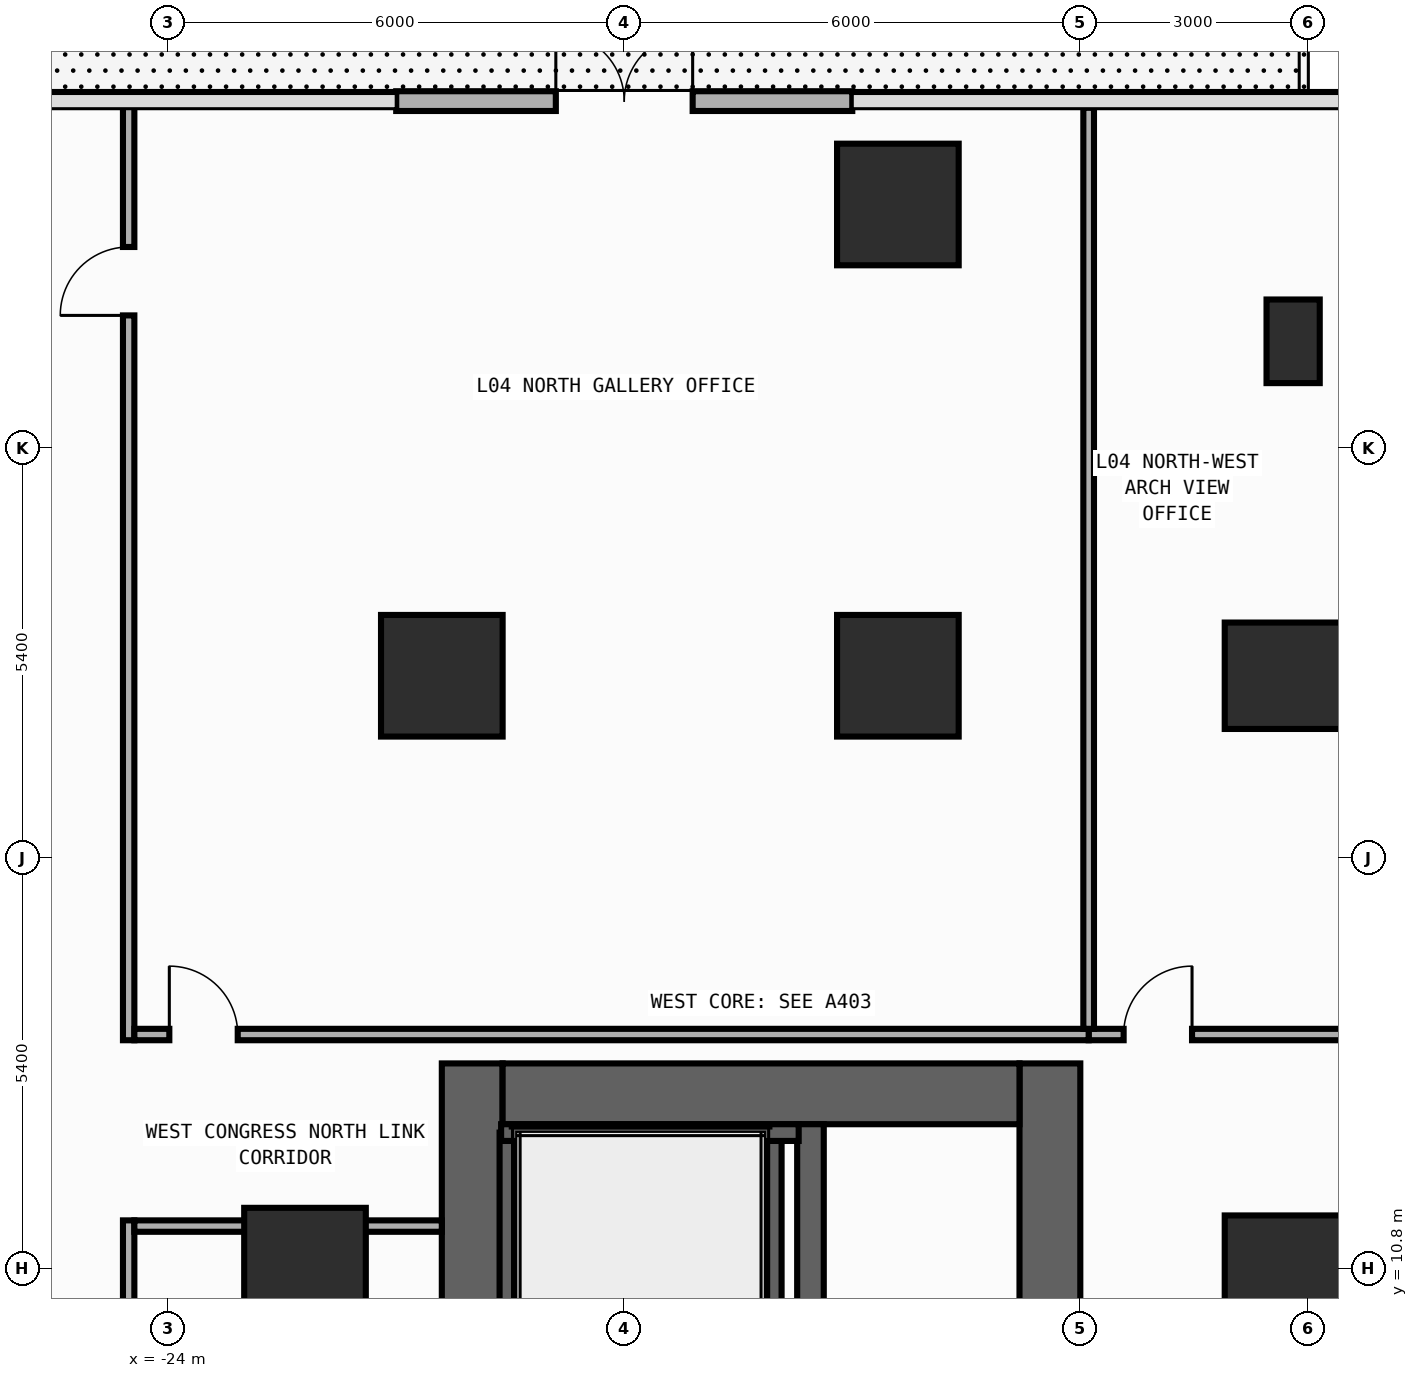
"""IFC4 building model, lengths in metres.
Left out: names, types, materials, properties, quantities, classifications, styles, units other than length and angle.
Written with IfcOpenShell. Run it as: python <this file> out.ifc"""

import sys

from ifc_helpers import new_model, si_unit, direction, frame, frame_2d, origin, origin_2d, place, context, subcontext, project, spatial, rectangle, extrude, element, fill, save


model = new_model("IFC4")
c1 = context("Model", 3, precision=1e-05, world=origin(), true_north=direction((0.0, 1.0)))
c2 = subcontext(c1, "Body", "Model", "MODEL_VIEW")
j1 = project(units=[si_unit("LENGTHUNIT", "METRE"), si_unit("PLANEANGLEUNIT", "RADIAN")], contexts=[c1])
p1 = place(None, origin())
s1 = spatial("IfcSite", under=j1, at=p1, CompositionType="ELEMENT")
p2 = place(p1, origin())
s2 = spatial("IfcBuilding", under=s1, at=p2, CompositionType="ELEMENT")
p3 = place(p2, frame((0.0, 0.0, 16.0)))
s3 = spatial("IfcBuildingStorey", under=s2, at=p3, CompositionType="ELEMENT", Elevation=16.0)
p4 = place(p3, frame((-20.0, -13.5, 0.0), z_axis=(0.0, 0.0, 1.0), x_axis=(0.0, 1.0, 0.0)))
e1 = element("IfcWall", 1, at=p4, inside=s3, PredefinedType="SHEAR", context=c2, shape_type="SweptSolid", body=[
    extrude(rectangle(XDim=27.0, YDim=0.8, at=frame_2d((13.5, 0.0))), origin(), (0.0, 0.0, 1.0), 4.55),
])
p5 = place(p3, frame((-12.4, -13.5, 0.0), z_axis=(0.0, 0.0, 1.0), x_axis=(0.0, 1.0, 0.0)))
e2 = element("IfcWall", 2, at=p5, inside=s3, PredefinedType="SHEAR", context=c2, shape_type="SweptSolid", body=[
    extrude(rectangle(XDim=27.0, YDim=0.8, at=frame_2d((13.5, 0.0))), origin(), (0.0, 0.0, 1.0), 4.55),
])
p6 = place(p5, frame((21.55, 0.0, 0.0)))
e3 = element("IfcOpeningElement", 3, at=p6, cuts=e2, PredefinedType="OPENING", context=c2, shape_type="SweptSolid", body=[
    extrude(rectangle(XDim=1.1, YDim=2.2, at=frame_2d((0.55, 1.1))), frame((0.0, 0.41, 0.0), z_axis=(0.0, -1.0, 0.0), x_axis=(1.0, 0.0, 0.0)), (0.0, 0.0, 1.0), 0.82),
])
p7 = place(p5, frame((18.35, 0.0, 0.0)))
e4 = element("IfcOpeningElement", 4, at=p7, cuts=e2, PredefinedType="OPENING", context=c2, shape_type="SweptSolid", body=[
    extrude(rectangle(XDim=1.1, YDim=2.2, at=frame_2d((0.55, 1.1))), frame((0.0, 0.41, 0.0), z_axis=(0.0, -1.0, 0.0), x_axis=(1.0, 0.0, 0.0)), (0.0, 0.0, 1.0), 0.82),
])
p8 = place(p5, frame((15.15, 0.0, 0.0)))
e5 = element("IfcOpeningElement", 5, at=p8, cuts=e2, PredefinedType="OPENING", context=c2, shape_type="SweptSolid", body=[
    extrude(rectangle(XDim=1.1, YDim=2.2, at=frame_2d((0.55, 1.1))), frame((0.0, 0.41, 0.0), z_axis=(0.0, -1.0, 0.0), x_axis=(1.0, 0.0, 0.0)), (0.0, 0.0, 1.0), 0.82),
])
p9 = place(p5, frame((10.35, 0.0, 0.0)))
e6 = element("IfcOpeningElement", 6, at=p9, cuts=e2, PredefinedType="OPENING", context=c2, shape_type="SweptSolid", body=[
    extrude(rectangle(XDim=1.1, YDim=2.2, at=frame_2d((0.55, 1.1))), frame((0.0, 0.41, 0.0), z_axis=(0.0, -1.0, 0.0), x_axis=(1.0, 0.0, 0.0)), (0.0, 0.0, 1.0), 0.82),
])
p10 = place(p5, frame((7.15, 0.0, 0.0)))
e7 = element("IfcOpeningElement", 7, at=p10, cuts=e2, PredefinedType="OPENING", context=c2, shape_type="SweptSolid", body=[
    extrude(rectangle(XDim=1.1, YDim=2.2, at=frame_2d((0.55, 1.1))), frame((0.0, 0.41, 0.0), z_axis=(0.0, -1.0, 0.0), x_axis=(1.0, 0.0, 0.0)), (0.0, 0.0, 1.0), 0.82),
])
p11 = place(p5, frame((3.95, 0.0, 0.0)))
e8 = element("IfcOpeningElement", 8, at=p11, cuts=e2, PredefinedType="OPENING", context=c2, shape_type="SweptSolid", body=[
    extrude(rectangle(XDim=1.1, YDim=2.2, at=frame_2d((0.55, 1.1))), frame((0.0, 0.41, 0.0), z_axis=(0.0, -1.0, 0.0), x_axis=(1.0, 0.0, 0.0)), (0.0, 0.0, 1.0), 0.82),
])
p12 = place(p5, frame((12.725, 0.0, 0.0)))
e9 = element("IfcOpeningElement", 9, at=p12, cuts=e2, PredefinedType="OPENING", context=c2, shape_type="SweptSolid", body=[
    extrude(rectangle(XDim=1.15, YDim=2.2, at=frame_2d((0.575, 1.1))), frame((0.0, 0.41, 0.0), z_axis=(0.0, -1.0, 0.0), x_axis=(1.0, 0.0, 0.0)), (0.0, 0.0, 1.0), 0.82),
])
p13 = place(p5, frame((1.625, 0.0, 0.0)))
e10 = element("IfcOpeningElement", 10, at=p13, cuts=e2, PredefinedType="OPENING", context=c2, shape_type="SweptSolid", body=[
    extrude(rectangle(XDim=0.85, YDim=2.1, at=frame_2d((0.425, 1.05))), frame((0.0, 0.41, 0.0), z_axis=(0.0, -1.0, 0.0), x_axis=(1.0, 0.0, 0.0)), (0.0, 0.0, 1.0), 0.82),
])
p14 = place(p3, frame((-19.6, 13.1, 0.0), z_axis=(0.0, 0.0, 1.0), x_axis=(1.0, 0.0, 0.0)))
e11 = element("IfcWall", 11, at=p14, inside=s3, PredefinedType="SHEAR", context=c2, shape_type="SweptSolid", body=[
    extrude(rectangle(XDim=6.8, YDim=0.8, at=frame_2d((3.4, 0.0))), origin(), (0.0, 0.0, 1.0), 4.55),
])
p15 = place(p3, frame((-15.55, -12.7, 0.0), z_axis=(0.0, 0.0, 1.0), x_axis=(0.0, 1.0, 0.0)))
e12 = element("IfcWall", 12, at=p15, inside=s3, PredefinedType="SHEAR", context=c2, shape_type="SweptSolid", body=[
    extrude(rectangle(XDim=25.4, YDim=0.35, at=frame_2d((12.7, 0.0))), origin(), (0.0, 0.0, 1.0), 4.55),
])
p16 = place(p15, frame((11.925, 0.0, 0.0)))
e13 = element("IfcOpeningElement", 13, at=p16, cuts=e12, PredefinedType="OPENING", context=c2, shape_type="SweptSolid", body=[
    extrude(rectangle(XDim=1.15, YDim=2.2, at=frame_2d((0.575, 1.1))), frame((0.0, 0.185, 0.0), z_axis=(0.0, -1.0, 0.0), x_axis=(1.0, 0.0, 0.0)), (0.0, 0.0, 1.0), 0.37),
])
p17 = place(p15, frame((0.825, 0.0, 0.0)))
e14 = element("IfcOpeningElement", 14, at=p17, cuts=e12, PredefinedType="OPENING", context=c2, shape_type="SweptSolid", body=[
    extrude(rectangle(XDim=0.85, YDim=2.1, at=frame_2d((0.425, 1.05))), frame((0.0, 0.185, 0.0), z_axis=(0.0, -1.0, 0.0), x_axis=(1.0, 0.0, 0.0)), (0.0, 0.0, 1.0), 0.37),
])
for number, where, z_axis, x_axis in (
    (15, (-16.04, 1.29, 0.0), (0.0, 0.0, 1.0), (0.0, 1.0, 0.0)),
    (16, (-19.53, 1.29, 0.0), (0.0, 0.0, 1.0), (0.0, 1.0, 0.0)),
):
    element("IfcWall", number, at=place(p3, frame(where, z_axis=z_axis, x_axis=x_axis)), inside=s3, PredefinedType="SHEAR", context=c2, shape_type="SweptSolid", body=[
        extrude(rectangle(XDim=11.3, YDim=0.22, at=frame_2d((5.65, 0.0))), origin(), (0.0, 0.0, 1.0), 4.55),
    ])
p18 = place(p3, frame((-19.62, 12.59, 0.0), z_axis=(0.0, 0.0, 1.0), x_axis=(1.0, 0.0, 0.0)))
e17 = element("IfcWall", 17, at=p18, inside=s3, PredefinedType="SHEAR", context=c2, shape_type="SweptSolid", body=[
    extrude(rectangle(XDim=3.915, YDim=0.22, at=frame_2d((1.958, 0.0))), origin(), (0.0, 0.0, 1.0), 4.55),
])
for number, where, z_axis, x_axis in (
    (18, (-9.2, 10.8, 0.0), (0.0, 0.0, 1.0), (1.0, 0.0, 0.0)),
    (19, (-9.2, 18.6, 0.0), (0.0, 0.0, 1.0), (1.0, 0.0, 0.0)),
):
    element("IfcColumn", number, at=place(p3, frame(where, z_axis=z_axis, x_axis=x_axis)), inside=s3, PredefinedType="COLUMN", context=c2, shape_type="SweptSolid", body=[
        extrude(rectangle(XDim=1.8, YDim=1.4, at=origin_2d()), origin(), (0.0, 0.0, 1.0), 5.0),
    ])
for number, where, z_axis, x_axis in (
    (20, (-20.4, 18.6, 0.0), (0.0, 0.0, 1.0), (1.0, 0.0, 0.0)),
    (21, (-14.4, 18.6, 0.0), (0.0, 0.0, 1.0), (1.0, 0.0, 0.0)),
    (22, (-22.2, 10.8, 0.0), (0.0, 0.0, 1.0), (1.0, 0.0, 0.0)),
    (23, (-14.4, 24.8, 0.0), (0.0, 0.0, 1.0), (1.0, 0.0, 0.0)),
):
    element("IfcColumn", number, at=place(p3, frame(where, z_axis=z_axis, x_axis=x_axis)), inside=s3, PredefinedType="COLUMN", context=c2, shape_type="SweptSolid", body=[
        extrude(rectangle(XDim=1.6, YDim=1.6, at=origin_2d()), origin(), (0.0, 0.0, 1.0), 5.0),
    ])
p19 = place(p3, frame((-9.2, 23.0, 0.0), z_axis=(0.0, 0.0, 1.0), x_axis=(1.0, 0.0, 0.0)))
e24 = element("IfcColumn", 24, at=p19, inside=s3, PredefinedType="PILASTER", context=c2, shape_type="SweptSolid", body=[
    extrude(rectangle(XDim=0.7, YDim=1.1, at=origin_2d()), origin(), (0.0, 0.0, 1.0), 5.0),
])
p20 = place(p3, frame((-21.0, 26.16, 0.0), z_axis=(0.0, 0.0, 1.0), x_axis=(1.0, 0.0, 0.0)))
e25 = element("IfcWall", 25, at=p20, inside=s3, PredefinedType="STANDARD", context=c2, shape_type="SweptSolid", body=[
    extrude(rectangle(XDim=6.0, YDim=0.26, at=frame_2d((3.0, 0.0))), origin(), (0.0, 0.0, 1.0), 4.55),
])
p21 = place(p20, frame((2.1, 0.0, 0.0)))
e26 = element("IfcOpeningElement", 26, at=p21, cuts=e25, PredefinedType="OPENING", context=c2, shape_type="SweptSolid", body=[
    extrude(rectangle(XDim=1.8, YDim=2.3, at=frame_2d((0.9, 1.15))), frame((0.0, 0.14, 0.0), z_axis=(0.0, -1.0, 0.0), x_axis=(1.0, 0.0, 0.0)), (0.0, 0.0, 1.0), 0.28),
])
p22 = place(p3, frame((-24.52, -13.795, 0.0), z_axis=(0.0, 0.0, 1.0), x_axis=(0.0, 1.0, 0.0)))
e27 = element("IfcWall", 27, at=p22, inside=s3, PredefinedType="PARTITIONING", context=c2, shape_type="SweptSolid", body=[
    extrude(rectangle(XDim=25.23, YDim=0.15, at=frame_2d((12.615, 0.0))), origin(), (0.0, 0.0, 1.0), 4.55),
])
p23 = place(p22, frame((7.863, 0.0, 0.0)))
e28 = element("IfcOpeningElement", 28, at=p23, cuts=e27, PredefinedType="OPENING", context=c2, shape_type="SweptSolid", body=[
    extrude(rectangle(XDim=0.9, YDim=2.15, at=frame_2d((0.45, 1.075))), frame((0.0, 0.085, 0.0), z_axis=(0.0, -1.0, 0.0), x_axis=(1.0, 0.0, 0.0)), (0.0, 0.0, 1.0), 0.17),
])
p24 = place(p3, frame((-24.52, 13.805, 0.0), z_axis=(0.0, 0.0, 1.0), x_axis=(0.0, 1.0, 0.0)))
e29 = element("IfcWall", 29, at=p24, inside=s3, PredefinedType="PARTITIONING", context=c2, shape_type="SweptSolid", body=[
    extrude(rectangle(XDim=12.308, YDim=0.15, at=frame_2d((6.154, 0.0))), origin(), (0.0, 0.0, 1.0), 4.55),
])
p25 = place(p24, frame((9.536, 0.0, 0.0)))
e30 = element("IfcOpeningElement", 30, at=p25, cuts=e29, PredefinedType="OPENING", context=c2, shape_type="SweptSolid", body=[
    extrude(rectangle(XDim=0.9, YDim=2.15, at=frame_2d((0.45, 1.075))), frame((0.0, 0.085, 0.0), z_axis=(0.0, -1.0, 0.0), x_axis=(1.0, 0.0, 0.0)), (0.0, 0.0, 1.0), 0.17),
])
p26 = place(p3, frame((-24.445, 11.36, 0.0), z_axis=(0.0, 0.0, 1.0), x_axis=(1.0, 0.0, 0.0)))
e31 = element("IfcWall", 31, at=p26, inside=s3, PredefinedType="PARTITIONING", context=c2, shape_type="SweptSolid", body=[
    extrude(rectangle(XDim=4.045, YDim=0.15, at=frame_2d((2.022, 0.0))), origin(), (0.0, 0.0, 1.0), 4.55),
])
p27 = place(p3, frame((-11.89, 13.88, 0.0), z_axis=(0.0, 0.0, 1.0), x_axis=(1.0, 0.0, 0.0)))
e32 = element("IfcWall", 32, at=p27, inside=s3, PredefinedType="PARTITIONING", context=c2, shape_type="SweptSolid", body=[
    extrude(rectangle(XDim=3.685, YDim=0.15, at=frame_2d((1.842, 0.0))), origin(), (0.0, 0.0, 1.0), 4.55),
])
p28 = place(p27, frame((0.46, 0.0, 0.0)))
e33 = element("IfcOpeningElement", 33, at=p28, cuts=e32, PredefinedType="OPENING", context=c2, shape_type="SweptSolid", body=[
    extrude(rectangle(XDim=0.9, YDim=2.15, at=frame_2d((0.45, 1.075))), frame((0.0, 0.085, 0.0), z_axis=(0.0, -1.0, 0.0), x_axis=(1.0, 0.0, 0.0)), (0.0, 0.0, 1.0), 0.17),
])
p29 = place(p3, frame((-24.445, 13.88, 0.0), z_axis=(0.0, 0.0, 1.0), x_axis=(1.0, 0.0, 0.0)))
e34 = element("IfcWall", 34, at=p29, inside=s3, PredefinedType="PARTITIONING", context=c2, shape_type="SweptSolid", body=[
    extrude(rectangle(XDim=12.555, YDim=0.15, at=frame_2d((6.278, 0.0))), origin(), (0.0, 0.0, 1.0), 4.55),
])
p30 = place(p29, frame((0.46, 0.0, 0.0)))
e35 = element("IfcOpeningElement", 35, at=p30, cuts=e34, PredefinedType="OPENING", context=c2, shape_type="SweptSolid", body=[
    extrude(rectangle(XDim=0.9, YDim=2.15, at=frame_2d((0.45, 1.075))), frame((0.0, 0.085, 0.0), z_axis=(0.0, -1.0, 0.0), x_axis=(1.0, 0.0, 0.0)), (0.0, 0.0, 1.0), 0.17),
])
p31 = place(p3, frame((-11.89, 13.955, 0.0), z_axis=(0.0, 0.0, 1.0), x_axis=(0.0, 1.0, 0.0)))
e36 = element("IfcWall", 36, at=p31, inside=s3, PredefinedType="PARTITIONING", context=c2, shape_type="SweptSolid", body=[
    extrude(rectangle(XDim=12.118, YDim=0.14, at=frame_2d((6.059, 0.0))), origin(), (0.0, 0.0, 1.0), 4.55),
])
p32 = place(p21, origin())
e37 = element("IfcDoor", 37, at=p32, inside=s3, OperationType="DOUBLE_DOOR_SINGLE_SWING", PredefinedType="DOOR", context=c2, shape_type="SweptSolid", body=[
    extrude(rectangle(XDim=1.8, YDim=2.3, at=frame_2d((0.9, 1.15))), frame((0.0, 0.025, 0.0), z_axis=(0.0, -1.0, 0.0), x_axis=(1.0, 0.0, 0.0)), (0.0, 0.0, 1.0), 0.05),
])
fill(e26, e37)
p33 = place(p25, origin())
e38 = element("IfcDoor", 38, at=p33, inside=s3, OperationType="SINGLE_SWING_LEFT", PredefinedType="DOOR", context=c2, shape_type="SweptSolid", body=[
    extrude(rectangle(XDim=0.9, YDim=2.15, at=frame_2d((0.45, 1.075))), frame((0.0, 0.025, 0.0), z_axis=(0.0, -1.0, 0.0), x_axis=(1.0, 0.0, 0.0)), (0.0, 0.0, 1.0), 0.05),
])
fill(e30, e38)
p34 = place(p28, origin())
e39 = element("IfcDoor", 39, at=p34, inside=s3, OperationType="SINGLE_SWING_RIGHT", PredefinedType="DOOR", context=c2, shape_type="SweptSolid", body=[
    extrude(rectangle(XDim=0.9, YDim=2.15, at=frame_2d((0.45, 1.075))), frame((0.0, 0.025, 0.0), z_axis=(0.0, -1.0, 0.0), x_axis=(1.0, 0.0, 0.0)), (0.0, 0.0, 1.0), 0.05),
])
fill(e33, e39)
p35 = place(p30, origin())
e40 = element("IfcDoor", 40, at=p35, inside=s3, OperationType="SINGLE_SWING_LEFT", PredefinedType="DOOR", context=c2, shape_type="SweptSolid", body=[
    extrude(rectangle(XDim=0.9, YDim=2.15, at=frame_2d((0.45, 1.075))), frame((0.0, 0.025, 0.0), z_axis=(0.0, -1.0, 0.0), x_axis=(1.0, 0.0, 0.0)), (0.0, 0.0, 1.0), 0.05),
])
fill(e35, e40)
save(model, sys.argv[1])
